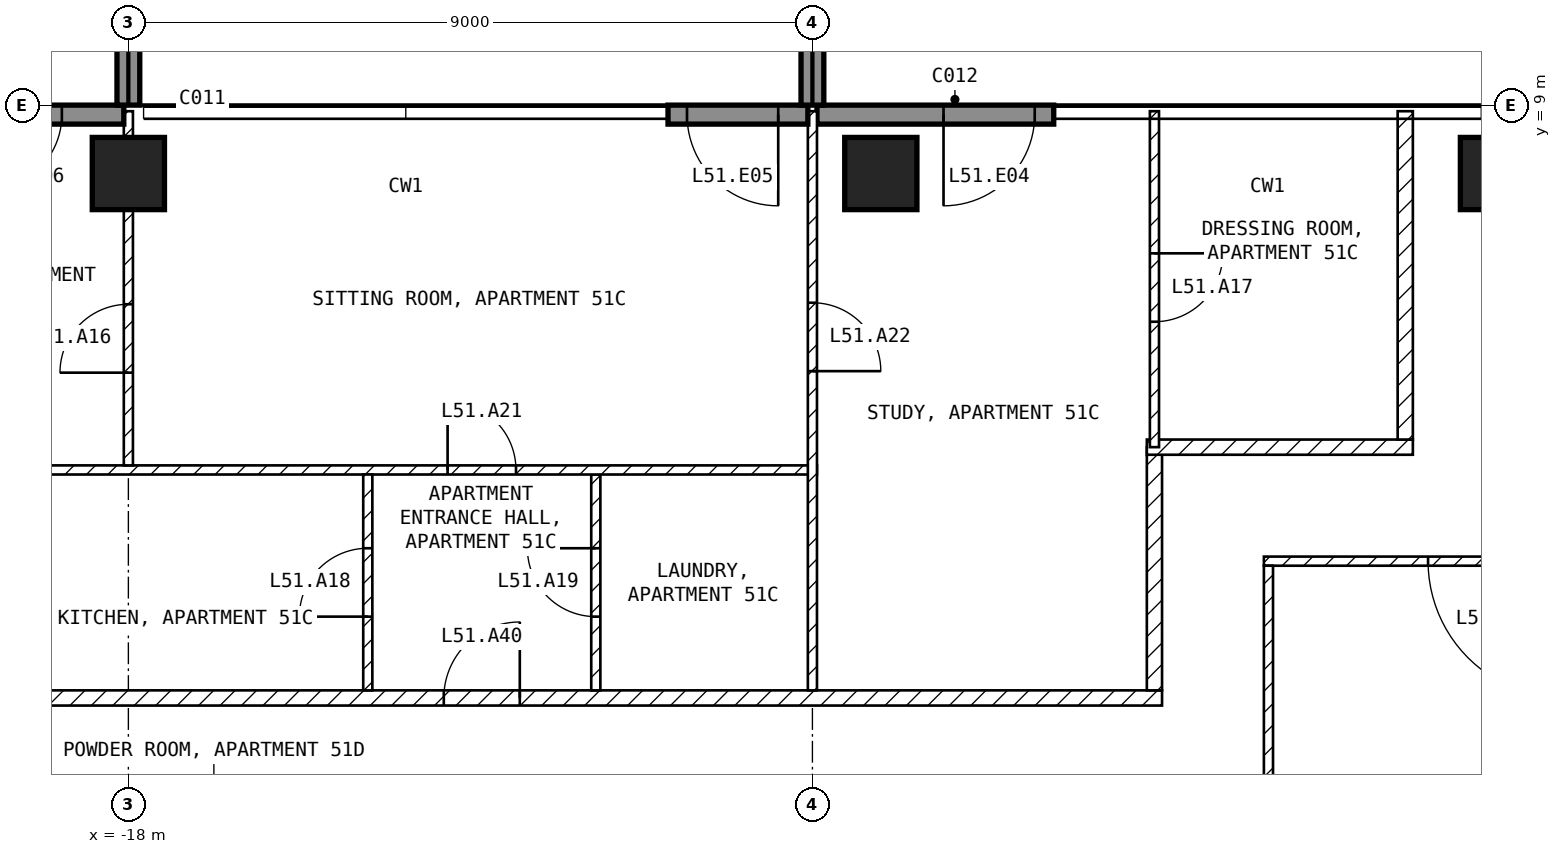
"""IFC4 building model, lengths in metres.
Left out: names, types, materials, properties, quantities, classifications, styles, units other than length and angle.
Written with IfcOpenShell. Run it as: python <this file> out.ifc"""

import sys

from ifc_helpers import new_model, si_unit, direction, frame, frame_2d, origin, origin_2d, place, context, subcontext, project, spatial, rectangle, extrude, element, fill, save


model = new_model("IFC4")
c1 = context("Model", 3, precision=1e-05, world=origin(), true_north=direction((0.0, 1.0)))
c2 = subcontext(c1, "Body", "Model", "MODEL_VIEW")
j1 = project(units=[si_unit("LENGTHUNIT", "METRE"), si_unit("PLANEANGLEUNIT", "RADIAN")], contexts=[c1])
p1 = place(None, origin())
s1 = spatial("IfcSite", under=j1, at=p1, CompositionType="ELEMENT")
p2 = place(p1, origin())
s2 = spatial("IfcBuilding", under=s1, at=p2, CompositionType="ELEMENT")
p3 = place(p2, frame((0.0, 0.0, 205.1)))
s3 = spatial("IfcBuildingStorey", under=s2, at=p3, CompositionType="ELEMENT", Elevation=205.1)
for number, where, z_axis, x_axis in (
    (1, (-18.0, 8.1, -0.25), (0.0, 0.0, 1.0), (1.0, 0.0, 0.0)),
    (2, (-8.1, 8.1, -0.25), (0.0, 0.0, 1.0), (1.0, 0.0, 0.0)),
    (3, (0.0, 8.1, -0.25), (0.0, 0.0, 1.0), (1.0, 0.0, 0.0)),
):
    element("IfcColumn", number, at=place(p3, frame(where, z_axis=z_axis, x_axis=x_axis)), inside=s3, PredefinedType="COLUMN", context=c2, shape_type="SweptSolid", body=[
        extrude(rectangle(XDim=0.95, YDim=0.95, at=origin_2d()), origin(), (0.0, 0.0, 1.0), 3.5),
    ])
p4 = place(p3, frame((-5.825, 8.875, 0.0), z_axis=(0.0, 0.0, 1.0), x_axis=(-1.0, 0.0, 0.0)))
e4 = element("IfcWall", 4, at=p4, inside=s3, PredefinedType="SOLIDWALL", context=c2, shape_type="SweptSolid", body=[
    extrude(rectangle(XDim=3.115, YDim=0.25, at=frame_2d((1.558, 0.0))), origin(), (0.0, 0.0, 1.0), 3.25),
])
p5 = place(p4, frame((0.25, 0.0, 0.0)))
e5 = element("IfcOpeningElement", 5, at=p5, cuts=e4, PredefinedType="OPENING", context=c2, shape_type="SweptSolid", body=[
    extrude(rectangle(XDim=1.2, YDim=2.4, at=frame_2d((0.6, 1.2))), frame((0.0, 0.135, 0.0), z_axis=(0.0, -1.0, 0.0), x_axis=(1.0, 0.0, 0.0)), (0.0, 0.0, 1.0), 0.27),
])
p6 = place(p3, frame((-9.06, 8.875, 0.0), z_axis=(0.0, 0.0, 1.0), x_axis=(-1.0, 0.0, 0.0)))
e6 = element("IfcWall", 6, at=p6, inside=s3, PredefinedType="SOLIDWALL", context=c2, shape_type="SweptSolid", body=[
    extrude(rectangle(XDim=1.84, YDim=0.25, at=frame_2d((0.92, 0.0))), origin(), (0.0, 0.0, 1.0), 3.25),
])
p7 = place(p6, frame((0.39, 0.0, 0.0)))
e7 = element("IfcOpeningElement", 7, at=p7, cuts=e6, PredefinedType="OPENING", context=c2, shape_type="SweptSolid", body=[
    extrude(rectangle(XDim=1.2, YDim=2.4, at=frame_2d((0.6, 1.2))), frame((0.0, 0.135, 0.0), z_axis=(0.0, -1.0, 0.0), x_axis=(1.0, 0.0, 0.0)), (0.0, 0.0, 1.0), 0.27),
])
p8 = place(p3, frame((-18.06, 8.875, 0.0), z_axis=(0.0, 0.0, 1.0), x_axis=(-1.0, 0.0, 0.0)))
e8 = element("IfcWall", 8, at=p8, inside=s3, PredefinedType="SOLIDWALL", context=c2, shape_type="SweptSolid", body=[
    extrude(rectangle(XDim=3.115, YDim=0.25, at=frame_2d((1.558, 0.0))), origin(), (0.0, 0.0, 1.0), 3.25),
])
p9 = place(p8, frame((0.815, 0.0, 0.0)))
e9 = element("IfcOpeningElement", 9, at=p9, cuts=e8, PredefinedType="OPENING", context=c2, shape_type="SweptSolid", body=[
    extrude(rectangle(XDim=1.0, YDim=2.4, at=frame_2d((0.5, 1.2))), frame((0.0, 0.135, 0.0), z_axis=(0.0, -1.0, 0.0), x_axis=(1.0, 0.0, 0.0)), (0.0, 0.0, 1.0), 0.27),
])
for number, where, z_axis, x_axis in (
    (10, (-18.0, 9.0, 0.0), (0.0, 0.0, 1.0), (0.0, 1.0, 0.0)),
    (11, (-9.0, 9.0, 0.0), (0.0, 0.0, 1.0), (0.0, 1.0, 0.0)),
):
    element("IfcWall", number, at=place(p3, frame(where, z_axis=z_axis, x_axis=x_axis)), inside=s3, PredefinedType="SOLIDWALL", context=c2, shape_type="SweptSolid", body=[
        extrude(rectangle(XDim=2.7, YDim=0.3, at=frame_2d((1.35, 0.0))), origin(), (0.0, 0.0, 1.0), 3.25),
    ])
p10 = place(p3, frame((3.06, 3.0, 0.0), z_axis=(0.0, 0.0, 1.0), x_axis=(-1.0, 0.0, 0.0)))
e12 = element("IfcWall", 12, at=p10, inside=s3, PredefinedType="PARTITIONING", context=c2, shape_type="SweptSolid", body=[
    extrude(rectangle(XDim=6.12, YDim=0.12, at=frame_2d((3.06, 0.0))), origin(), (0.0, 0.0, 1.0), 3.25),
])
p11 = place(p10, frame((2.16, 0.0, 0.0)))
e13 = element("IfcOpeningElement", 13, at=p11, cuts=e12, PredefinedType="OPENING", context=c2, shape_type="SweptSolid", body=[
    extrude(rectangle(XDim=1.8, YDim=2.1, at=frame_2d((0.9, 1.05))), frame((0.0, 0.07, 0.0), z_axis=(0.0, -1.0, 0.0), x_axis=(1.0, 0.0, 0.0)), (0.0, 0.0, 1.0), 0.14),
])
p12 = place(p3, frame((-3.0, 2.94, 0.0), z_axis=(0.0, 0.0, 1.0), x_axis=(0.0, -1.0, 0.0)))
e14 = element("IfcWall", 14, at=p12, inside=s3, PredefinedType="PARTITIONING", context=c2, shape_type="SweptSolid", body=[
    extrude(rectangle(XDim=5.88, YDim=0.12, at=frame_2d((2.94, 0.0))), origin(), (0.0, 0.0, 1.0), 3.25),
])
p13 = place(p3, frame((-21.6, 1.2, 0.0), z_axis=(0.0, 0.0, 1.0), x_axis=(1.0, 0.0, 0.0)))
e15 = element("IfcWall", 15, at=p13, inside=s3, PredefinedType="PARTITIONING", context=c2, shape_type="SweptSolid", body=[
    extrude(rectangle(XDim=17.2, YDim=0.2, at=frame_2d((8.6, 0.0))), origin(), (0.0, 0.0, 1.0), 3.25),
])
p14 = place(p13, frame((7.75, 0.0, 0.0)))
e16 = element("IfcOpeningElement", 16, at=p14, cuts=e15, PredefinedType="OPENING", context=c2, shape_type="SweptSolid", body=[
    extrude(rectangle(XDim=1.0, YDim=2.1, at=frame_2d((0.5, 1.05))), frame((0.0, 0.11, 0.0), z_axis=(0.0, -1.0, 0.0), x_axis=(1.0, 0.0, 0.0)), (0.0, 0.0, 1.0), 0.22),
])
p15 = place(p3, frame((-4.5, 1.3, 0.0), z_axis=(0.0, 0.0, 1.0), x_axis=(0.0, 1.0, 0.0)))
e17 = element("IfcWall", 17, at=p15, inside=s3, PredefinedType="PARTITIONING", context=c2, shape_type="SweptSolid", body=[
    extrude(rectangle(XDim=3.2, YDim=0.2, at=frame_2d((1.6, 0.0))), origin(), (0.0, 0.0, 1.0), 3.25),
])
p16 = place(p3, frame((-4.6, 4.5, 0.0), z_axis=(0.0, 0.0, 1.0), x_axis=(1.0, 0.0, 0.0)))
e18 = element("IfcWall", 18, at=p16, inside=s3, PredefinedType="PARTITIONING", context=c2, shape_type="SweptSolid", body=[
    extrude(rectangle(XDim=3.5, YDim=0.2, at=frame_2d((1.75, 0.0))), origin(), (0.0, 0.0, 1.0), 3.25),
])
p17 = place(p3, frame((-1.2, 4.6, 0.0), z_axis=(0.0, 0.0, 1.0), x_axis=(0.0, 1.0, 0.0)))
e19 = element("IfcWall", 19, at=p17, inside=s3, PredefinedType="PARTITIONING", context=c2, shape_type="SweptSolid", body=[
    extrude(rectangle(XDim=4.32, YDim=0.2, at=frame_2d((2.16, 0.0))), origin(), (0.0, 0.0, 1.0), 3.25),
])
p18 = place(p3, frame((-11.85, 1.3, 0.0), z_axis=(0.0, 0.0, 1.0), x_axis=(0.0, 1.0, 0.0)))
e20 = element("IfcWall", 20, at=p18, inside=s3, PredefinedType="PARTITIONING", context=c2, shape_type="SweptSolid", body=[
    extrude(rectangle(XDim=2.84, YDim=0.12, at=frame_2d((1.42, 0.0))), origin(), (0.0, 0.0, 1.0), 3.25),
])
p19 = place(p18, frame((0.97, 0.0, 0.0)))
e21 = element("IfcOpeningElement", 21, at=p19, cuts=e20, PredefinedType="OPENING", context=c2, shape_type="SweptSolid", body=[
    extrude(rectangle(XDim=0.9, YDim=2.1, at=frame_2d((0.45, 1.05))), frame((0.0, 0.07, 0.0), z_axis=(0.0, -1.0, 0.0), x_axis=(1.0, 0.0, 0.0)), (0.0, 0.0, 1.0), 0.14),
])
p20 = place(p3, frame((-19.65, 4.2, 0.0), z_axis=(0.0, 0.0, 1.0), x_axis=(1.0, 0.0, 0.0)))
e22 = element("IfcWall", 22, at=p20, inside=s3, PredefinedType="PARTITIONING", context=c2, shape_type="SweptSolid", body=[
    extrude(rectangle(XDim=10.71, YDim=0.12, at=frame_2d((5.355, 0.0))), origin(), (0.0, 0.0, 1.0), 3.25),
])
p21 = place(p20, frame((5.85, 0.0, 0.0)))
e23 = element("IfcOpeningElement", 23, at=p21, cuts=e22, PredefinedType="OPENING", context=c2, shape_type="SweptSolid", body=[
    extrude(rectangle(XDim=0.9, YDim=2.1, at=frame_2d((0.45, 1.05))), frame((0.0, 0.07, 0.0), z_axis=(0.0, -1.0, 0.0), x_axis=(1.0, 0.0, 0.0)), (0.0, 0.0, 1.0), 0.14),
])
p22 = place(p3, frame((-9.0, 8.92, 0.0), z_axis=(0.0, 0.0, 1.0), x_axis=(0.0, -1.0, 0.0)))
e24 = element("IfcWall", 24, at=p22, inside=s3, PredefinedType="PARTITIONING", context=c2, shape_type="SweptSolid", body=[
    extrude(rectangle(XDim=7.62, YDim=0.12, at=frame_2d((3.81, 0.0))), origin(), (0.0, 0.0, 1.0), 3.25),
])
p23 = place(p22, frame((2.52, 0.0, 0.0)))
e25 = element("IfcOpeningElement", 25, at=p23, cuts=e24, PredefinedType="OPENING", context=c2, shape_type="SweptSolid", body=[
    extrude(rectangle(XDim=0.9, YDim=2.1, at=frame_2d((0.45, 1.05))), frame((0.0, 0.07, 0.0), z_axis=(0.0, -1.0, 0.0), x_axis=(1.0, 0.0, 0.0)), (0.0, 0.0, 1.0), 0.14),
])
p24 = place(p3, frame((-14.85, 1.3, 0.0), z_axis=(0.0, 0.0, 1.0), x_axis=(0.0, 1.0, 0.0)))
e26 = element("IfcWall", 26, at=p24, inside=s3, PredefinedType="PARTITIONING", context=c2, shape_type="SweptSolid", body=[
    extrude(rectangle(XDim=2.84, YDim=0.12, at=frame_2d((1.42, 0.0))), origin(), (0.0, 0.0, 1.0), 3.25),
])
p25 = place(p24, frame((0.97, 0.0, 0.0)))
e27 = element("IfcOpeningElement", 27, at=p25, cuts=e26, PredefinedType="OPENING", context=c2, shape_type="SweptSolid", body=[
    extrude(rectangle(XDim=0.9, YDim=2.1, at=frame_2d((0.45, 1.05))), frame((0.0, 0.07, 0.0), z_axis=(0.0, -1.0, 0.0), x_axis=(1.0, 0.0, 0.0)), (0.0, 0.0, 1.0), 0.14),
])
p26 = place(p3, frame((-18.0, 4.26, 0.0), z_axis=(0.0, 0.0, 1.0), x_axis=(0.0, 1.0, 0.0)))
e28 = element("IfcWall", 28, at=p26, inside=s3, PredefinedType="PARTITIONING", context=c2, shape_type="SweptSolid", body=[
    extrude(rectangle(XDim=4.66, YDim=0.12, at=frame_2d((2.33, 0.0))), origin(), (0.0, 0.0, 1.0), 2.48),
])
p27 = place(p26, frame((1.22, 0.0, 0.0)))
e29 = element("IfcOpeningElement", 29, at=p27, cuts=e28, PredefinedType="OPENING", context=c2, shape_type="SweptSolid", body=[
    extrude(rectangle(XDim=0.9, YDim=2.1, at=frame_2d((0.45, 1.05))), frame((0.0, 0.07, 0.0), z_axis=(0.0, -1.0, 0.0), x_axis=(1.0, 0.0, 0.0)), (0.0, 0.0, 1.0), 0.14),
])
p28 = place(p3, frame((-4.5, 8.92, 0.0), z_axis=(0.0, 0.0, 1.0), x_axis=(0.0, -1.0, 0.0)))
e30 = element("IfcWall", 30, at=p28, inside=s3, PredefinedType="PARTITIONING", context=c2, shape_type="SweptSolid", body=[
    extrude(rectangle(XDim=4.42, YDim=0.12, at=frame_2d((2.21, 0.0))), origin(), (0.0, 0.0, 1.0), 3.25),
])
p29 = place(p28, frame((1.87, 0.0, 0.0)))
e31 = element("IfcOpeningElement", 31, at=p29, cuts=e30, PredefinedType="OPENING", context=c2, shape_type="SweptSolid", body=[
    extrude(rectangle(XDim=0.9, YDim=2.1, at=frame_2d((0.45, 1.05))), frame((0.0, 0.07, 0.0), z_axis=(0.0, -1.0, 0.0), x_axis=(1.0, 0.0, 0.0)), (0.0, 0.0, 1.0), 0.14),
])
p30 = place(p5, origin())
e32 = element("IfcDoor", 32, at=p30, inside=s3, OperationType="SINGLE_SWING_RIGHT", PredefinedType="DOOR", context=c2, shape_type="SweptSolid", body=[
    extrude(rectangle(XDim=1.2, YDim=2.4, at=frame_2d((0.6, 1.2))), frame((0.0, 0.025, 0.0), z_axis=(0.0, -1.0, 0.0), x_axis=(1.0, 0.0, 0.0)), (0.0, 0.0, 1.0), 0.05),
])
fill(e5, e32)
p31 = place(p7, origin())
e33 = element("IfcDoor", 33, at=p31, inside=s3, OperationType="SINGLE_SWING_LEFT", PredefinedType="DOOR", context=c2, shape_type="SweptSolid", body=[
    extrude(rectangle(XDim=1.2, YDim=2.4, at=frame_2d((0.6, 1.2))), frame((0.0, 0.025, 0.0), z_axis=(0.0, -1.0, 0.0), x_axis=(1.0, 0.0, 0.0)), (0.0, 0.0, 1.0), 0.05),
])
fill(e7, e33)
p32 = place(p9, origin())
e34 = element("IfcDoor", 34, at=p32, inside=s3, OperationType="SINGLE_SWING_RIGHT", PredefinedType="DOOR", context=c2, shape_type="SweptSolid", body=[
    extrude(rectangle(XDim=1.0, YDim=2.4, at=frame_2d((0.5, 1.2))), frame((0.0, 0.025, 0.0), z_axis=(0.0, -1.0, 0.0), x_axis=(1.0, 0.0, 0.0)), (0.0, 0.0, 1.0), 0.05),
])
fill(e9, e34)
p33 = place(p11, origin())
e35 = element("IfcDoor", 35, at=p33, inside=s3, OperationType="SINGLE_SWING_LEFT", PredefinedType="DOOR", context=c2, shape_type="SweptSolid", body=[
    extrude(rectangle(XDim=1.8, YDim=2.1, at=frame_2d((0.9, 1.05))), frame((0.0, 0.025, 0.0), z_axis=(0.0, -1.0, 0.0), x_axis=(1.0, 0.0, 0.0)), (0.0, 0.0, 1.0), 0.05),
])
fill(e13, e35)
p34 = place(p27, origin())
e36 = element("IfcDoor", 36, at=p34, inside=s3, OperationType="SINGLE_SWING_LEFT", PredefinedType="DOOR", context=c2, shape_type="SweptSolid", body=[
    extrude(rectangle(XDim=0.9, YDim=2.1, at=frame_2d((0.45, 1.05))), frame((0.0, 0.025, 0.0), z_axis=(0.0, -1.0, 0.0), x_axis=(1.0, 0.0, 0.0)), (0.0, 0.0, 1.0), 0.05),
])
fill(e29, e36)
p35 = place(p29, origin())
e37 = element("IfcDoor", 37, at=p35, inside=s3, OperationType="SINGLE_SWING_LEFT", PredefinedType="DOOR", context=c2, shape_type="SweptSolid", body=[
    extrude(rectangle(XDim=0.9, YDim=2.1, at=frame_2d((0.45, 1.05))), frame((0.0, 0.025, 0.0), z_axis=(0.0, -1.0, 0.0), x_axis=(1.0, 0.0, 0.0)), (0.0, 0.0, 1.0), 0.05),
])
fill(e31, e37)
p36 = place(p25, origin())
e38 = element("IfcDoor", 38, at=p36, inside=s3, OperationType="SINGLE_SWING_LEFT", PredefinedType="DOOR", context=c2, shape_type="SweptSolid", body=[
    extrude(rectangle(XDim=0.9, YDim=2.1, at=frame_2d((0.45, 1.05))), frame((0.0, 0.025, 0.0), z_axis=(0.0, -1.0, 0.0), x_axis=(1.0, 0.0, 0.0)), (0.0, 0.0, 1.0), 0.05),
])
fill(e27, e38)
p37 = place(p19, origin())
e39 = element("IfcDoor", 39, at=p37, inside=s3, OperationType="SINGLE_SWING_RIGHT", PredefinedType="DOOR", context=c2, shape_type="SweptSolid", body=[
    extrude(rectangle(XDim=0.9, YDim=2.1, at=frame_2d((0.45, 1.05))), frame((0.0, 0.025, 0.0), z_axis=(0.0, -1.0, 0.0), x_axis=(1.0, 0.0, 0.0)), (0.0, 0.0, 1.0), 0.05),
])
fill(e21, e39)
p38 = place(p21, origin())
e40 = element("IfcDoor", 40, at=p38, inside=s3, OperationType="SINGLE_SWING_LEFT", PredefinedType="DOOR", context=c2, shape_type="SweptSolid", body=[
    extrude(rectangle(XDim=0.9, YDim=2.1, at=frame_2d((0.45, 1.05))), frame((0.0, 0.025, 0.0), z_axis=(0.0, -1.0, 0.0), x_axis=(1.0, 0.0, 0.0)), (0.0, 0.0, 1.0), 0.05),
])
fill(e23, e40)
p39 = place(p23, origin())
e41 = element("IfcDoor", 41, at=p39, inside=s3, OperationType="SINGLE_SWING_RIGHT", PredefinedType="DOOR", context=c2, shape_type="SweptSolid", body=[
    extrude(rectangle(XDim=0.9, YDim=2.1, at=frame_2d((0.45, 1.05))), frame((0.0, 0.025, 0.0), z_axis=(0.0, -1.0, 0.0), x_axis=(1.0, 0.0, 0.0)), (0.0, 0.0, 1.0), 0.05),
])
fill(e25, e41)
p40 = place(p14, origin())
e42 = element("IfcDoor", 42, at=p40, inside=s3, OperationType="SINGLE_SWING_RIGHT", PredefinedType="DOOR", context=c2, shape_type="SweptSolid", body=[
    extrude(rectangle(XDim=1.0, YDim=2.1, at=frame_2d((0.5, 1.05))), frame((0.0, 0.025, 0.0), z_axis=(0.0, -1.0, 0.0), x_axis=(1.0, 0.0, 0.0)), (0.0, 0.0, 1.0), 0.05),
])
fill(e16, e42)
save(model, sys.argv[1])
